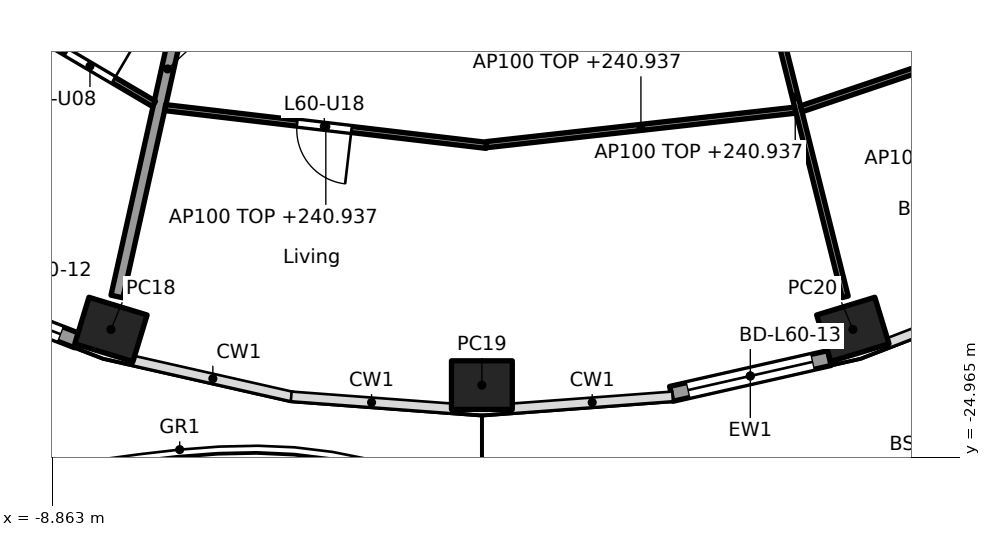
"""IFC4 building model, lengths in metres.
Left out: names, types, materials, properties, quantities, classifications, styles, units other than length and angle.
Written with IfcOpenShell. Run it as: python <this file> out.ifc"""

import sys

from ifc_helpers import new_model, si_unit, direction, frame, frame_2d, origin, origin_2d, place, context, subcontext, project, spatial, rectangle, hollow_rectangle, extrude, element, fill, save


model = new_model("IFC4")
c1 = context("Model", 3, precision=1e-05, world=origin(), true_north=direction((0.0, 1.0)))
c2 = subcontext(c1, "Body", "Model", "MODEL_VIEW")
j1 = project(units=[si_unit("LENGTHUNIT", "METRE"), si_unit("PLANEANGLEUNIT", "RADIAN")], contexts=[c1])
p1 = place(None, origin())
s1 = spatial("IfcSite", under=j1, at=p1, CompositionType="ELEMENT")
p2 = place(p1, origin())
s2 = spatial("IfcBuilding", under=s1, at=p2, CompositionType="ELEMENT")
p3 = place(p2, frame((0.0, 0.0, 238.1)))
s3 = spatial("IfcBuildingStorey", under=s2, at=p3, CompositionType="ELEMENT", Elevation=238.1)
for number, where, z_axis, x_axis in (
    (1, (-7.9, -22.856, 0.0), (0.0, 0.0, 1.0), (0.957, -0.292, 0.0)),
    (2, (-1.8, -23.772, 0.0), (0.0, 0.0, 1.0), (1.0, 0.0, 0.0)),
    (3, (4.3, -22.856, 0.0), (0.0, 0.0, 1.0), (0.957, 0.292, 0.0)),
):
    element("IfcColumn", number, at=place(p3, frame(where, z_axis=z_axis, x_axis=x_axis)), inside=s3, PredefinedType="COLUMN", context=c2, shape_type="SweptSolid", body=[
        extrude(hollow_rectangle(XDim=1.0, YDim=0.8, WallThickness=0.032, at=origin_2d()), origin(), (0.0, 0.0, 1.0), 3.7),
    ])
p4 = place(p3, frame((-8.451, -23.042, 0.0), z_axis=(0.0, 0.0, 1.0), x_axis=(-0.932826499224, 0.360325855782, 0.0)))
e4 = element("IfcWall", 4, at=p4, inside=s3, PredefinedType="SOLIDWALL", context=c2, shape_type="SweptSolid", body=[
    extrude(rectangle(XDim=2.696, YDim=0.25, at=frame_2d((1.348, 0.0))), origin(), (0.0, 0.0, 1.0), 3.44),
])
p5 = place(p4, frame((0.298, 0.0, 0.0)))
e5 = element("IfcOpeningElement", 5, at=p5, cuts=e4, PredefinedType="OPENING", context=c2, shape_type="SweptSolid", body=[
    extrude(rectangle(XDim=2.1, YDim=2.4, at=frame_2d((1.05, 1.2))), frame((0.0, 0.135, 0.0), z_axis=(0.0, -1.0, 0.0), x_axis=(1.0, 0.0, 0.0)), (0.0, 0.0, 1.0), 0.27),
])
p6 = place(p3, frame((3.915, -23.327, 0.0), z_axis=(0.0, 0.0, 1.0), x_axis=(-0.975324089124, -0.220777990694, 0.0)))
e6 = element("IfcWall", 6, at=p6, inside=s3, PredefinedType="SOLIDWALL", context=c2, shape_type="SweptSolid", body=[
    extrude(rectangle(XDim=2.666, YDim=0.25, at=frame_2d((1.333, 0.0))), origin(), (0.0, 0.0, 1.0), 3.44),
])
p7 = place(p6, frame((0.283, 0.0, 0.0)))
e7 = element("IfcOpeningElement", 7, at=p7, cuts=e6, PredefinedType="OPENING", context=c2, shape_type="SweptSolid", body=[
    extrude(rectangle(XDim=2.1, YDim=2.4, at=frame_2d((1.05, 1.2))), frame((0.0, 0.135, 0.0), z_axis=(0.0, -1.0, 0.0), x_axis=(1.0, 0.0, 0.0)), (0.0, 0.0, 1.0), 0.27),
])
p8 = place(p3, frame((-6.134, -14.831, 0.0), z_axis=(0.0, 0.0, 1.0), x_axis=(-0.217500172543, -0.976060282433, 0.0)))
e8 = element("IfcWall", 8, at=p8, inside=s3, PredefinedType="PARTITIONING", context=c2, shape_type="SweptSolid", body=[
    extrude(rectangle(XDim=7.668, YDim=0.2, at=frame_2d((3.834, 0.0))), origin(), (0.0, 0.0, 1.0), 2.837),
])
p9 = place(p3, frame((-7.709, -10.198, 0.0), z_axis=(0.0, 0.0, 1.0), x_axis=(-0.507355901053, -0.8617366127, 0.0)))
e9 = element("IfcWall", 9, at=p9, inside=s3, PredefinedType="PARTITIONING", context=c2, shape_type="SweptSolid", body=[
    extrude(rectangle(XDim=11.025, YDim=0.1, at=frame_2d((5.512, 0.0))), origin(), (0.0, 0.0, 1.0), 2.762),
])
p10 = place(p9, frame((1.326, 0.0, 0.0)))
e10 = element("IfcOpeningElement", 10, at=p10, cuts=e9, PredefinedType="OPENING", context=c2, shape_type="SweptSolid", body=[
    extrude(rectangle(XDim=0.9, YDim=2.1, at=frame_2d((0.45, 1.05))), frame((0.0, 0.06, 0.0), z_axis=(0.0, -1.0, 0.0), x_axis=(1.0, 0.0, 0.0)), (0.0, 0.0, 1.0), 0.12),
])
p11 = place(p9, frame((5.05, 0.0, 0.0)))
e11 = element("IfcOpeningElement", 11, at=p11, cuts=e9, PredefinedType="OPENING", context=c2, shape_type="SweptSolid", body=[
    extrude(rectangle(XDim=0.9, YDim=2.1, at=frame_2d((0.45, 1.05))), frame((0.0, 0.06, 0.0), z_axis=(0.0, -1.0, 0.0), x_axis=(1.0, 0.0, 0.0)), (0.0, 0.0, 1.0), 0.12),
])
p12 = place(p9, frame((8.787, 0.0, 0.0)))
e12 = element("IfcOpeningElement", 12, at=p12, cuts=e9, PredefinedType="OPENING", context=c2, shape_type="SweptSolid", body=[
    extrude(rectangle(XDim=0.9, YDim=2.1, at=frame_2d((0.45, 1.05))), frame((0.0, 0.06, 0.0), z_axis=(0.0, -1.0, 0.0), x_axis=(1.0, 0.0, 0.0)), (0.0, 0.0, 1.0), 0.12),
])
p13 = place(p3, frame((-11.445, -16.641, 0.0), z_axis=(0.0, 0.0, 1.0), x_axis=(0.861568986754, -0.507640503766, 0.0)))
e13 = element("IfcWall", 13, at=p13, inside=s3, PredefinedType="PARTITIONING", context=c2, shape_type="SweptSolid", body=[
    extrude(rectangle(XDim=4.935, YDim=0.1, at=frame_2d((2.467, 0.0))), origin(), (0.0, 0.0, 1.0), 2.837),
])
p14 = place(p13, frame((3.264, 0.0, 0.0)))
e14 = element("IfcOpeningElement", 14, at=p14, cuts=e13, PredefinedType="OPENING", context=c2, shape_type="SweptSolid", body=[
    extrude(rectangle(XDim=0.9, YDim=2.1, at=frame_2d((0.45, 1.05))), frame((0.0, 0.06, 0.0), z_axis=(0.0, -1.0, 0.0), x_axis=(1.0, 0.0, 0.0)), (0.0, 0.0, 1.0), 0.12),
])
p15 = place(p3, frame((-7.008, -19.209, 0.0), z_axis=(0.0, 0.0, 1.0), x_axis=(0.993173459887, -0.116646811258, 0.0)))
e15 = element("IfcWall", 15, at=p15, inside=s3, PredefinedType="PARTITIONING", context=c2, shape_type="SweptSolid", body=[
    extrude(rectangle(XDim=5.318, YDim=0.1, at=frame_2d((2.659, 0.0))), origin(), (0.0, 0.0, 1.0), 2.837),
])
p16 = place(p15, frame((2.184, 0.0, 0.0)))
e16 = element("IfcOpeningElement", 16, at=p16, cuts=e15, PredefinedType="OPENING", context=c2, shape_type="SweptSolid", body=[
    extrude(rectangle(XDim=0.9, YDim=2.1, at=frame_2d((0.45, 1.05))), frame((0.0, 0.06, 0.0), z_axis=(0.0, -1.0, 0.0), x_axis=(1.0, 0.0, 0.0)), (0.0, 0.0, 1.0), 0.12),
])
p17 = place(p3, frame((-1.726, -19.818, 0.0), z_axis=(0.0, 0.0, 1.0), x_axis=(0.99381893047, 0.111013212902, 0.0)))
e17 = element("IfcWall", 17, at=p17, inside=s3, PredefinedType="PARTITIONING", context=c2, shape_type="SweptSolid", body=[
    extrude(rectangle(XDim=5.113, YDim=0.1, at=frame_2d((2.557, 0.0))), origin(), (0.0, 0.0, 1.0), 2.837),
])
p18 = place(p3, frame((2.531, -15.749, 0.0), z_axis=(0.0, 0.0, 1.0), x_axis=(0.242645858264, -0.970114935184, 0.0)))
e18 = element("IfcWall", 18, at=p18, inside=s3, PredefinedType="PARTITIONING", context=c2, shape_type="SweptSolid", body=[
    extrude(rectangle(XDim=6.774, YDim=0.1, at=frame_2d((3.387, 0.0))), origin(), (0.0, 0.0, 1.0), 2.837),
])
p19 = place(p18, frame((1.377, 0.0, 0.0)))
e19 = element("IfcOpeningElement", 19, at=p19, cuts=e18, PredefinedType="OPENING", context=c2, shape_type="SweptSolid", body=[
    extrude(rectangle(XDim=0.9, YDim=2.1, at=frame_2d((0.45, 1.05))), frame((0.0, 0.06, 0.0), z_axis=(0.0, -1.0, 0.0), x_axis=(1.0, 0.0, 0.0)), (0.0, 0.0, 1.0), 0.12),
])
p20 = place(p3, frame((3.453, -19.229, 0.0), z_axis=(0.0, 0.0, 1.0), x_axis=(0.947572025416, 0.319542261133, 0.0)))
e20 = element("IfcWall", 20, at=p20, inside=s3, PredefinedType="PARTITIONING", context=c2, shape_type="SweptSolid", body=[
    extrude(rectangle(XDim=4.903, YDim=0.1, at=frame_2d((2.451, 0.0))), origin(), (0.0, 0.0, 1.0), 2.837),
])
p21 = place(p20, frame((2.001, 0.0, 0.0)))
e21 = element("IfcOpeningElement", 21, at=p21, cuts=e20, PredefinedType="OPENING", context=c2, shape_type="SweptSolid", body=[
    extrude(rectangle(XDim=0.9, YDim=2.1, at=frame_2d((0.45, 1.05))), frame((0.0, 0.06, 0.0), z_axis=(0.0, -1.0, 0.0), x_axis=(1.0, 0.0, 0.0)), (0.0, 0.0, 1.0), 0.12),
])
p22 = place(p5, origin())
e22 = element("IfcDoor", 22, at=p22, inside=s3, OperationType="SLIDING_TO_LEFT", PredefinedType="DOOR", context=c2, shape_type="SweptSolid", body=[
    extrude(rectangle(XDim=2.1, YDim=2.4, at=frame_2d((1.05, 1.2))), frame((0.0, 0.025, 0.0), z_axis=(0.0, -1.0, 0.0), x_axis=(1.0, 0.0, 0.0)), (0.0, 0.0, 1.0), 0.05),
])
fill(e5, e22)
p23 = place(p7, origin())
e23 = element("IfcDoor", 23, at=p23, inside=s3, OperationType="SLIDING_TO_LEFT", PredefinedType="DOOR", context=c2, shape_type="SweptSolid", body=[
    extrude(rectangle(XDim=2.1, YDim=2.4, at=frame_2d((1.05, 1.2))), frame((0.0, 0.025, 0.0), z_axis=(0.0, -1.0, 0.0), x_axis=(1.0, 0.0, 0.0)), (0.0, 0.0, 1.0), 0.05),
])
fill(e7, e23)
p24 = place(p14, origin())
e24 = element("IfcDoor", 24, at=p24, inside=s3, OperationType="SINGLE_SWING_RIGHT", PredefinedType="DOOR", context=c2, shape_type="SweptSolid", body=[
    extrude(rectangle(XDim=0.9, YDim=2.1, at=frame_2d((0.45, 1.05))), frame((0.0, 0.025, 0.0), z_axis=(0.0, -1.0, 0.0), x_axis=(1.0, 0.0, 0.0)), (0.0, 0.0, 1.0), 0.05),
])
fill(e14, e24)
p25 = place(p16, frame((0.9, 0.0, 0.0), x_axis=(-1.0, 0.0, 0.0)))
e25 = element("IfcDoor", 25, at=p25, inside=s3, OperationType="SINGLE_SWING_LEFT", PredefinedType="DOOR", context=c2, shape_type="SweptSolid", body=[
    extrude(rectangle(XDim=0.9, YDim=2.1, at=frame_2d((0.45, 1.05))), frame((0.0, 0.025, 0.0), z_axis=(0.0, -1.0, 0.0), x_axis=(1.0, 0.0, 0.0)), (0.0, 0.0, 1.0), 0.05),
])
fill(e16, e25)
save(model, sys.argv[1])
